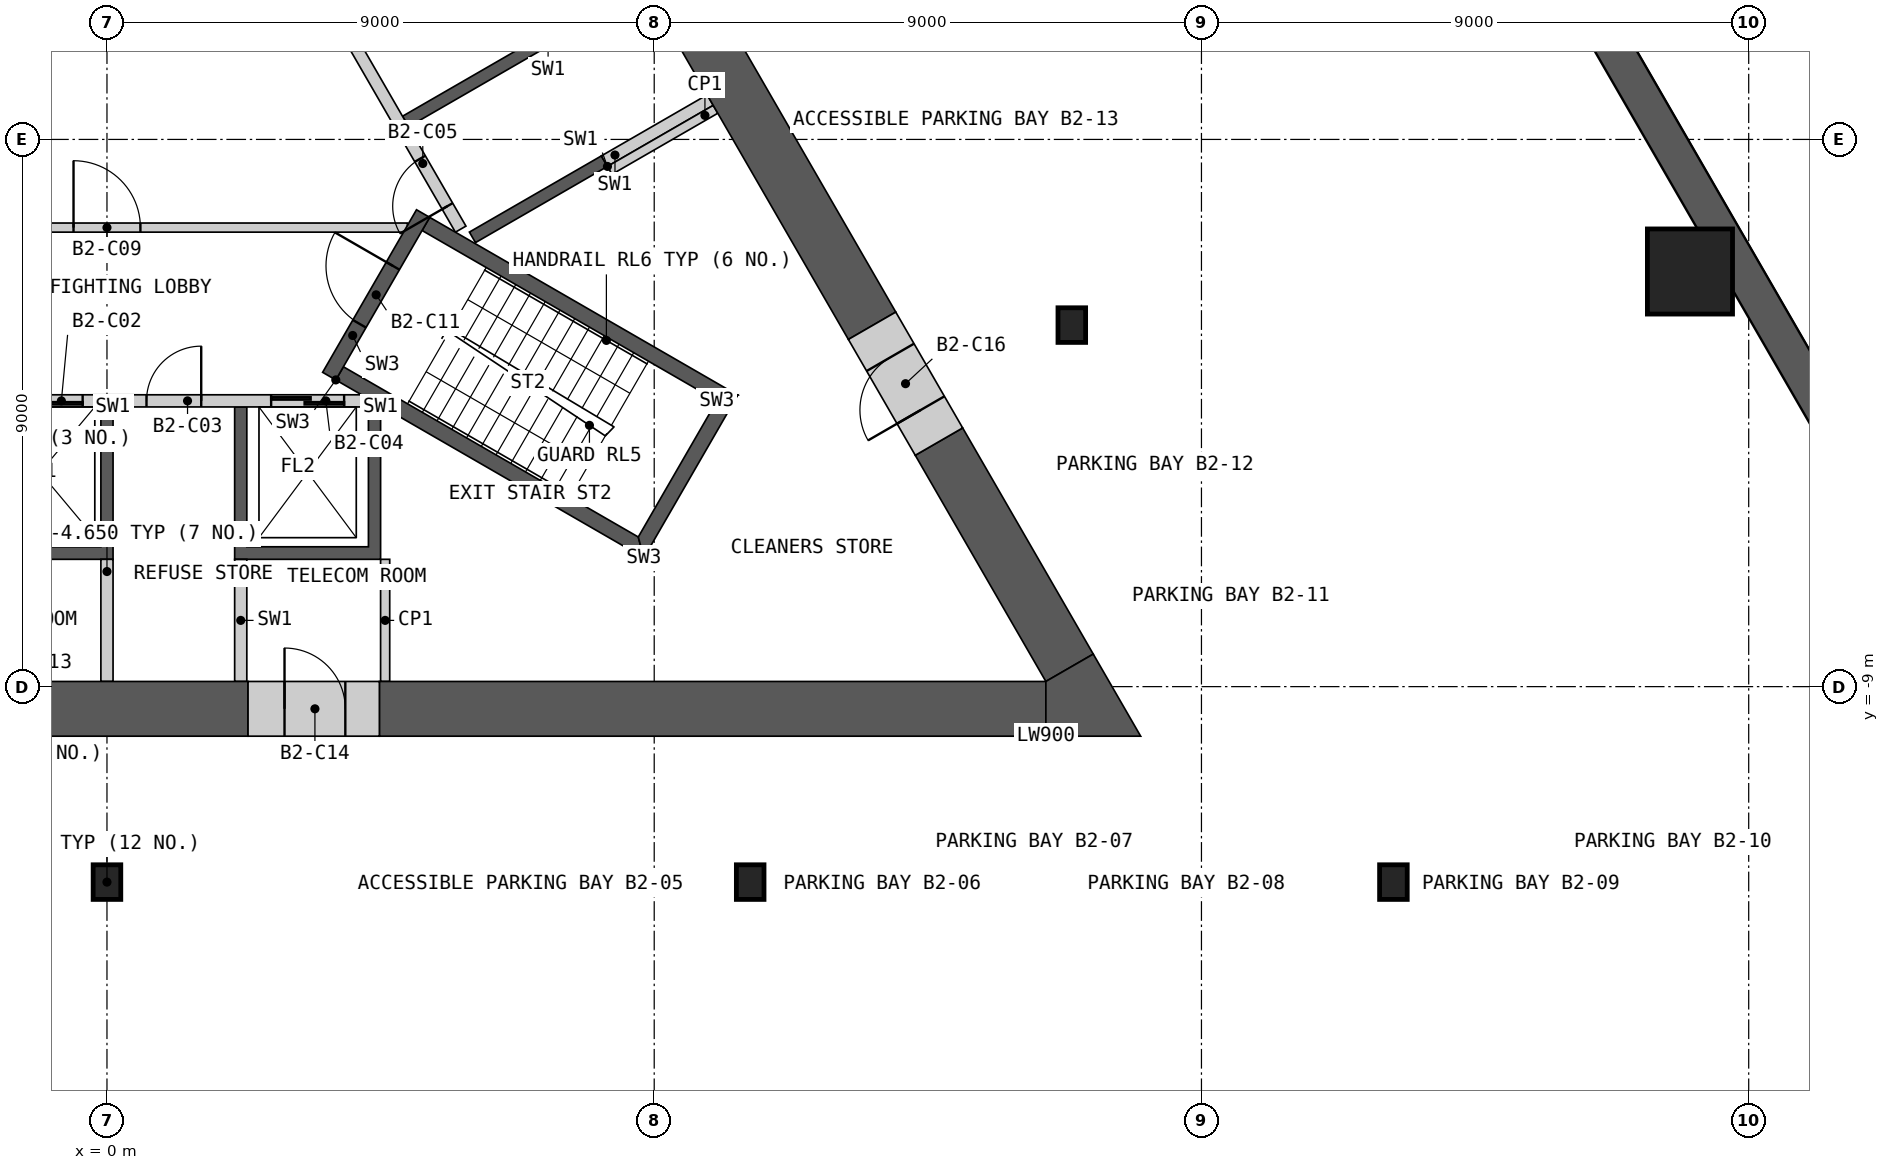
"""IFC4 building model, lengths in metres.
Left out: names, types, materials, properties, quantities, classifications, styles, units other than length and angle.
Written with IfcOpenShell. Run it as: python <this file> out.ifc"""

import sys

from ifc_helpers import new_model, si_unit, direction, frame, frame_2d, origin, origin_2d, place, context, subcontext, project, spatial, polyline, rectangle, hollow_rectangle, i_section, outline, extrude, element, fill, save


model = new_model("IFC4")
c1 = context("Model", 3, precision=1e-05, world=origin(), true_north=direction((0.0, 1.0)))
c2 = subcontext(c1, "Body", "Model", "MODEL_VIEW")
j1 = project(units=[si_unit("LENGTHUNIT", "METRE"), si_unit("PLANEANGLEUNIT", "RADIAN")], contexts=[c1])
p1 = place(None, origin())
s1 = spatial("IfcSite", under=j1, at=p1, CompositionType="ELEMENT")
p2 = place(p1, origin())
s2 = spatial("IfcBuilding", under=s1, at=p2, CompositionType="ELEMENT")
p3 = place(p2, frame((0.0, 0.0, -8.4)))
s3 = spatial("IfcBuildingStorey", under=s2, at=p3, CompositionType="ELEMENT", Elevation=-8.4)
p4 = place(p3, frame((28.154, -16.455, 0.0), z_axis=(0.0, 0.0, 1.0), x_axis=(0.499993492265, 0.866029160995, 0.0)))
e1 = element("IfcWall", 1, at=p4, inside=s3, PredefinedType="SOLIDWALL", context=c2, shape_type="SweptSolid", body=[
    extrude(rectangle(XDim=7.173, YDim=0.6, at=frame_2d((3.587, 0.0))), origin(), (0.0, 0.0, 1.0), 3.75),
])
p5 = place(p3, frame((31.74, -10.542, 0.0), z_axis=(0.0, 0.0, 1.0), x_axis=(-0.500000005698, 0.866025400495, 0.0)))
e2 = element("IfcWall", 2, at=p5, inside=s3, PredefinedType="SOLIDWALL", context=c2, shape_type="SweptSolid", body=[
    extrude(rectangle(XDim=50.0, YDim=0.6, at=frame_2d((25.0, 0.0))), origin(), (0.0, 0.0, 1.0), 3.75),
])
p6 = place(p3, frame((26.034, -2.172, 0.0), z_axis=(0.0, 0.0, 1.0), x_axis=(1.0, 0.0, 0.0)))
e3 = element("IfcColumn", 3, at=p6, inside=s3, PredefinedType="COLUMN", context=c2, shape_type="SweptSolid", body=[
    extrude(hollow_rectangle(XDim=1.4, YDim=1.4, WallThickness=0.1, at=origin_2d()), origin(), (0.0, 0.0, 1.0), 4.2),
])
for number, where, z_axis, x_axis in (
    (4, (0.0, -12.215, 0.0), (0.0, 0.0, 1.0), (1.0, 0.0, 0.0)),
    (5, (10.578, -12.215, 0.0), (0.0, 0.0, 1.0), (1.0, 0.0, 0.0)),
    (6, (21.157, -12.215, 0.0), (0.0, 0.0, 1.0), (1.0, 0.0, 0.0)),
    (7, (15.868, -3.054, 0.0), (0.0, 0.0, 1.0), (1.0, 0.0, 0.0)),
):
    element("IfcColumn", number, at=place(p3, frame(where, z_axis=z_axis, x_axis=x_axis)), inside=s3, PredefinedType="COLUMN", context=c2, shape_type="SweptSolid", body=[
        extrude(i_section(OverallWidth=0.454, OverallDepth=0.57, WebThickness=0.078, FlangeThickness=0.125, at=origin_2d()), origin(), (0.0, 0.0, 1.0), 4.2),
    ])
p7 = place(p3, origin())
e8 = element("IfcWall", 8, at=p7, inside=s3, PredefinedType="SHEAR", context=c2, shape_type="SweptSolid", body=[
    extrude(outline(polyline([(4.5, -4.4), (4.5, -6.906), (2.1, -6.906), (2.1, -4.4), (2.3, -4.4), (2.3, -6.7), (4.3, -6.7), (4.3, -4.4), (4.5, -4.4)])), origin(), (0.0, 0.0, 1.0), 3.75),
])
p8 = place(p3, origin())
e9 = element("IfcWall", 9, at=p8, inside=s3, PredefinedType="SHEAR", context=c2, shape_type="SweptSolid", body=[
    extrude(outline(polyline([(0.1, -4.4), (0.1, -6.906), (-4.5, -6.906), (-4.5, -4.4), (-4.3, -4.4), (-4.3, -6.7), (-2.3, -6.7), (-2.3, -4.4), (-2.1, -4.4), (-2.1, -6.7), (-0.1, -6.7), (-0.1, -4.4), (0.1, -4.4)])), origin(), (0.0, 0.0, 1.0), 3.75),
])
p9 = place(p3, frame((-4.187, -4.3, 0.0), z_axis=(0.0, 0.0, 1.0), x_axis=(1.0, 0.0, 0.0)))
e10 = element("IfcWall", 10, at=p9, inside=s3, PredefinedType="SOLIDWALL", context=c2, shape_type="SweptSolid", body=[
    extrude(rectangle(XDim=8.373, YDim=0.2, at=frame_2d((4.187, 0.0))), origin(), (0.0, 0.0, 1.0), 3.75),
])
p10 = place(p9, frame((0.287, 0.0, 0.0)))
e11 = element("IfcOpeningElement", 11, at=p10, cuts=e10, PredefinedType="OPENING", context=c2, shape_type="SweptSolid", body=[
    extrude(rectangle(XDim=1.2, YDim=2.1, at=frame_2d((0.6, 1.05))), frame((0.0, 0.11, 0.0), z_axis=(0.0, -1.0, 0.0), x_axis=(1.0, 0.0, 0.0)), (0.0, 0.0, 1.0), 0.22),
])
p11 = place(p9, frame((2.387, 0.0, 0.0)))
e12 = element("IfcOpeningElement", 12, at=p11, cuts=e10, PredefinedType="OPENING", context=c2, shape_type="SweptSolid", body=[
    extrude(rectangle(XDim=1.4, YDim=2.1, at=frame_2d((0.7, 1.05))), frame((0.0, 0.11, 0.0), z_axis=(0.0, -1.0, 0.0), x_axis=(1.0, 0.0, 0.0)), (0.0, 0.0, 1.0), 0.22),
])
p12 = place(p9, frame((4.837, 0.0, 0.0)))
e13 = element("IfcOpeningElement", 13, at=p12, cuts=e10, PredefinedType="OPENING", context=c2, shape_type="SweptSolid", body=[
    extrude(rectangle(XDim=0.9, YDim=2.1, at=frame_2d((0.45, 1.05))), frame((0.0, 0.11, 0.0), z_axis=(0.0, -1.0, 0.0), x_axis=(1.0, 0.0, 0.0)), (0.0, 0.0, 1.0), 0.22),
])
p13 = place(p9, frame((6.887, 0.0, 0.0)))
e14 = element("IfcOpeningElement", 14, at=p13, cuts=e10, PredefinedType="OPENING", context=c2, shape_type="SweptSolid", body=[
    extrude(rectangle(XDim=1.2, YDim=2.1, at=frame_2d((0.6, 1.05))), frame((0.0, 0.11, 0.0), z_axis=(0.0, -1.0, 0.0), x_axis=(1.0, 0.0, 0.0)), (0.0, 0.0, 1.0), 0.22),
])
for number, where, z_axis, x_axis in (
    (15, (0.0, -6.906, 0.0), (0.0, 0.0, 1.0), (0.0, -1.0, 0.0)),
    (16, (2.2, -6.906, 0.0), (0.0, 0.0, 1.0), (0.0, -1.0, 0.0)),
):
    element("IfcWall", number, at=place(p3, frame(where, z_axis=z_axis, x_axis=x_axis)), inside=s3, PredefinedType="SHEAR", context=c2, shape_type="SweptSolid", body=[
        extrude(rectangle(XDim=2.009, YDim=0.2, at=frame_2d((1.004, 0.0))), origin(), (0.0, 0.0, 1.0), 3.75),
    ])
p14 = place(p3, origin())
e17 = element("IfcWall", 17, at=p14, inside=s3, PredefinedType="SHEAR", context=c2, shape_type="SweptSolid", body=[
    extrude(outline(polyline([(1.561, 6.097), (3.731, 7.35), (7.131, 1.461), (4.96, 0.208), (4.861, 0.381), (6.852, 1.531), (3.652, 7.074), (1.66, 5.924), (1.561, 6.097)])), origin(), (0.0, 0.0, 1.0), 3.75),
])
p15 = place(p3, origin())
e18 = element("IfcWall", 18, at=p15, inside=s3, PredefinedType="SHEAR", context=c2, shape_type="SweptSolid", body=[
    extrude(outline(polyline([(8.231, -0.444), (6.061, -1.697), (5.96, -1.524), (8.131, -0.271), (8.231, -0.444)])), origin(), (0.0, 0.0, 1.0), 3.75),
])
p16 = place(p3, frame((5.817, -1.476, 0.0), z_axis=(0.0, 0.0, 1.0), x_axis=(-0.500002616675, 0.866023893041, 0.0)))
e19 = element("IfcWall", 19, at=p16, inside=s3, PredefinedType="SOLIDWALL", context=c2, shape_type="SweptSolid", body=[
    extrude(rectangle(XDim=8.373, YDim=0.2, at=frame_2d((4.187, 0.0))), origin(), (0.0, 0.0, 1.0), 3.75),
])
p17 = place(p16, frame((0.437, 0.0, 0.0)))
e20 = element("IfcOpeningElement", 20, at=p17, cuts=e19, PredefinedType="OPENING", context=c2, shape_type="SweptSolid", body=[
    extrude(rectangle(XDim=0.9, YDim=2.1, at=frame_2d((0.45, 1.05))), frame((0.0, 0.11, 0.0), z_axis=(0.0, -1.0, 0.0), x_axis=(1.0, 0.0, 0.0)), (0.0, 0.0, 1.0), 0.22),
])
p18 = place(p16, frame((4.837, 0.0, 0.0)))
e21 = element("IfcOpeningElement", 21, at=p18, cuts=e19, PredefinedType="OPENING", context=c2, shape_type="SweptSolid", body=[
    extrude(rectangle(XDim=0.9, YDim=2.1, at=frame_2d((0.45, 1.05))), frame((0.0, 0.11, 0.0), z_axis=(0.0, -1.0, 0.0), x_axis=(1.0, 0.0, 0.0)), (0.0, 0.0, 1.0), 0.22),
])
p19 = place(p3, frame((8.181, -0.357, 0.0), z_axis=(0.0, 0.0, 1.0), x_axis=(0.866035824272, 0.499981950752, 0.0)))
e22 = element("IfcWall", 22, at=p19, inside=s3, PredefinedType="SHEAR", context=c2, shape_type="SweptSolid", body=[
    extrude(rectangle(XDim=2.009, YDim=0.2, at=frame_2d((1.004, 0.0))), origin(), (0.0, 0.0, 1.0), 3.75),
])
p20 = place(p3, frame((-4.941, -1.45, 0.0), z_axis=(0.0, 0.0, 1.0), x_axis=(1.0, 0.0, 0.0)))
e23 = element("IfcWall", 23, at=p20, inside=s3, PredefinedType="PARTITIONING", context=c2, shape_type="SweptSolid", body=[
    extrude(rectangle(XDim=9.882, YDim=0.15, at=frame_2d((4.941, 0.0))), origin(), (0.0, 0.0, 1.0), 3.75),
])
p21 = place(p20, frame((4.391, 0.0, 0.0)))
e24 = element("IfcOpeningElement", 24, at=p21, cuts=e23, PredefinedType="OPENING", context=c2, shape_type="SweptSolid", body=[
    extrude(rectangle(XDim=1.1, YDim=2.1, at=frame_2d((0.55, 1.05))), frame((0.0, 0.085, 0.0), z_axis=(0.0, -1.0, 0.0), x_axis=(1.0, 0.0, 0.0)), (0.0, 0.0, 1.0), 0.17),
])
p22 = place(p3, origin())
e25 = element("IfcWall", 25, at=p22, inside=s3, PredefinedType="SHEAR", context=c2, shape_type="SweptSolid", body=[
    extrude(outline(polyline([(3.763, -3.956), (8.83, -6.881), (8.738, -6.539), (3.888, -3.739), (3.763, -3.956)])), origin(), (0.0, 0.0, 1.0), 3.75),
])
p23 = place(p3, origin())
e26 = element("IfcWall", 26, at=p23, inside=s3, PredefinedType="SHEAR", context=c2, shape_type="SweptSolid", body=[
    extrude(outline(polyline([(8.83, -6.881), (10.374, -4.206), (10.032, -4.298), (8.738, -6.539), (8.83, -6.881)])), origin(), (0.0, 0.0, 1.0), 3.75),
])
p24 = place(p3, origin())
e27 = element("IfcWall", 27, at=p24, inside=s3, PredefinedType="SHEAR", context=c2, shape_type="SweptSolid", body=[
    extrude(outline(polyline([(10.032, -4.298), (10.374, -4.206), (5.307, -1.281), (5.182, -1.498), (10.032, -4.298)])), origin(), (0.0, 0.0, 1.0), 3.75),
])
p25 = place(p3, frame((3.655, -3.893, 0.0), z_axis=(0.0, 0.0, 1.0), x_axis=(0.499982516597, 0.866035497597, 0.0)))
e28 = element("IfcWall", 28, at=p25, inside=s3, PredefinedType="SHEAR", context=c2, shape_type="SweptSolid", body=[
    extrude(rectangle(XDim=3.088, YDim=0.25, at=frame_2d((1.544, 0.0))), origin(), (0.0, 0.0, 1.0), 3.75),
])
p26 = place(p25, frame((0.994, 0.0, 0.0)))
e29 = element("IfcOpeningElement", 29, at=p26, cuts=e28, PredefinedType="OPENING", context=c2, shape_type="SweptSolid", body=[
    extrude(rectangle(XDim=1.1, YDim=2.1, at=frame_2d((0.55, 1.05))), frame((0.0, 0.135, 0.0), z_axis=(0.0, -1.0, 0.0), x_axis=(1.0, 0.0, 0.0)), (0.0, 0.0, 1.0), 0.27),
])
p27 = place(p3, frame((4.575, -6.906, 0.0), z_axis=(0.0, 0.0, 1.0), x_axis=(0.0, -1.0, 0.0)))
e30 = element("IfcWall", 30, at=p27, inside=s3, PredefinedType="PARTITIONING", context=c2, shape_type="SweptSolid", body=[
    extrude(rectangle(XDim=2.009, YDim=0.15, at=frame_2d((1.004, 0.0))), origin(), (0.0, 0.0, 1.0), 3.75),
])
p28 = place(p3, frame((8.268, -0.509, 0.0), z_axis=(0.0, 0.0, 1.0), x_axis=(0.866035824272, 0.499981950752, 0.0)))
e31 = element("IfcWall", 31, at=p28, inside=s3, PredefinedType="PARTITIONING", context=c2, shape_type="SweptSolid", body=[
    extrude(rectangle(XDim=2.009, YDim=0.15, at=frame_2d((1.004, 0.0))), origin(), (0.0, 0.0, 1.0), 3.75),
])
p29 = place(p3, frame((4.48, -9.365, 0.0), z_axis=(0.0, 0.0, 1.0), x_axis=(1.0, 0.0, 0.0)))
e32 = element("IfcWall", 32, at=p29, inside=s3, PredefinedType="SHEAR", context=c2, shape_type="SweptSolid", body=[
    extrude(rectangle(XDim=10.961, YDim=0.9, at=frame_2d((5.48, 0.0))), origin(), (0.0, 0.0, 1.0), 3.75),
])
p30 = place(p3, frame((-1.2, -9.365, 0.0), z_axis=(0.0, 0.0, 1.0), x_axis=(1.0, 0.0, 0.0)))
e33 = element("IfcWall", 33, at=p30, inside=s3, PredefinedType="SHEAR", context=c2, shape_type="SweptSolid", body=[
    extrude(rectangle(XDim=3.52, YDim=0.9, at=frame_2d((1.76, 0.0))), origin(), (0.0, 0.0, 1.0), 3.75),
])
p31 = place(p3, frame((12.583, -3.065, 0.0), z_axis=(0.0, 0.0, 1.0), x_axis=(-0.499991853951, 0.866030106857, 0.0)))
e34 = element("IfcWall", 34, at=p31, inside=s3, PredefinedType="SHEAR", context=c2, shape_type="SweptSolid", body=[
    extrude(rectangle(XDim=10.094, YDim=0.9, at=frame_2d((5.047, 0.0))), origin(), (0.0, 0.0, 1.0), 3.75),
])
p32 = place(p3, frame((15.831, -8.69, 0.0), z_axis=(0.0, 0.0, 1.0), x_axis=(-0.499996331799, 0.866027521611, 0.0)))
e35 = element("IfcWall", 35, at=p32, inside=s3, PredefinedType="SHEAR", context=c2, shape_type="SweptSolid", body=[
    extrude(rectangle(XDim=4.295, YDim=0.9, at=frame_2d((2.148, 0.0))), origin(), (0.0, 0.0, 1.0), 3.75),
])
p33 = place(p3, origin())
e36 = element("IfcWall", 36, at=p33, inside=s3, PredefinedType="SHEAR", context=c2, shape_type="SweptSolid", body=[
    extrude(outline(polyline([(15.441, -9.815), (15.441, -8.915), (16.221, -8.465), (17.0, -9.815), (15.441, -9.815)])), origin(), (0.0, 0.0, 1.0), 3.75),
])
p34 = place(p3, frame((2.32, -9.365, 0.0), z_axis=(0.0, 0.0, 1.0), x_axis=(1.0, 0.0, 0.0)))
e37 = element("IfcWall", 37, at=p34, inside=s3, PredefinedType="SHEAR", context=c2, shape_type="SweptSolid", body=[
    extrude(rectangle(XDim=2.16, YDim=0.9, at=frame_2d((1.08, 0.0))), origin(), (0.0, 0.0, 1.0), 3.75),
])
p35 = place(p34, frame((0.6, 0.0, 0.0)))
e38 = element("IfcOpeningElement", 38, at=p35, cuts=e37, PredefinedType="OPENING", context=c2, shape_type="SweptSolid", body=[
    extrude(rectangle(XDim=1.0, YDim=2.1, at=frame_2d((0.5, 1.05))), frame((0.0, 0.46, 0.0), z_axis=(0.0, -1.0, 0.0), x_axis=(1.0, 0.0, 0.0)), (0.0, 0.0, 1.0), 0.92),
])
p36 = place(p3, frame((13.683, -4.97, 0.0), z_axis=(0.0, 0.0, 1.0), x_axis=(-0.50002983664, 0.866008176907, 0.0)))
e39 = element("IfcWall", 39, at=p36, inside=s3, PredefinedType="SHEAR", context=c2, shape_type="SweptSolid", body=[
    extrude(rectangle(XDim=2.2, YDim=0.9, at=frame_2d((1.1, 0.0))), origin(), (0.0, 0.0, 1.0), 3.75),
])
p37 = place(p36, frame((0.6, 0.0, 0.0)))
e40 = element("IfcOpeningElement", 40, at=p37, cuts=e39, PredefinedType="OPENING", context=c2, shape_type="SweptSolid", body=[
    extrude(rectangle(XDim=1.0, YDim=2.1, at=frame_2d((0.5, 1.05))), frame((0.0, 0.46, 0.0), z_axis=(0.0, -1.0, 0.0), x_axis=(1.0, 0.0, 0.0)), (0.0, 0.0, 1.0), 0.92),
])
p38 = place(p11, origin())
e41 = element("IfcDoor", 41, at=p38, inside=s3, OperationType="SLIDING_TO_LEFT", PredefinedType="DOOR", context=c2, shape_type="SweptSolid", body=[
    extrude(rectangle(XDim=1.4, YDim=2.1, at=frame_2d((0.7, 1.05))), frame((0.0, 0.025, 0.0), z_axis=(0.0, -1.0, 0.0), x_axis=(1.0, 0.0, 0.0)), (0.0, 0.0, 1.0), 0.05),
])
fill(e12, e41)
p39 = place(p12, origin())
e42 = element("IfcDoor", 42, at=p39, inside=s3, OperationType="SINGLE_SWING_RIGHT", PredefinedType="DOOR", context=c2, shape_type="SweptSolid", body=[
    extrude(rectangle(XDim=0.9, YDim=2.1, at=frame_2d((0.45, 1.05))), frame((0.0, 0.025, 0.0), z_axis=(0.0, -1.0, 0.0), x_axis=(1.0, 0.0, 0.0)), (0.0, 0.0, 1.0), 0.05),
])
fill(e13, e42)
p40 = place(p13, origin())
e43 = element("IfcDoor", 43, at=p40, inside=s3, OperationType="SLIDING_TO_LEFT", PredefinedType="DOOR", context=c2, shape_type="SweptSolid", body=[
    extrude(rectangle(XDim=1.2, YDim=2.1, at=frame_2d((0.6, 1.05))), frame((0.0, 0.025, 0.0), z_axis=(0.0, -1.0, 0.0), x_axis=(1.0, 0.0, 0.0)), (0.0, 0.0, 1.0), 0.05),
])
fill(e14, e43)
p41 = place(p17, origin())
e44 = element("IfcDoor", 44, at=p41, inside=s3, OperationType="SINGLE_SWING_LEFT", PredefinedType="DOOR", context=c2, shape_type="SweptSolid", body=[
    extrude(rectangle(XDim=0.9, YDim=2.1, at=frame_2d((0.45, 1.05))), frame((0.0, 0.025, 0.0), z_axis=(0.0, -1.0, 0.0), x_axis=(1.0, 0.0, 0.0)), (0.0, 0.0, 1.0), 0.05),
])
fill(e20, e44)
p42 = place(p21, origin())
e45 = element("IfcDoor", 45, at=p42, inside=s3, OperationType="SINGLE_SWING_LEFT", PredefinedType="DOOR", context=c2, shape_type="SweptSolid", body=[
    extrude(rectangle(XDim=1.1, YDim=2.1, at=frame_2d((0.55, 1.05))), frame((0.0, 0.025, 0.0), z_axis=(0.0, -1.0, 0.0), x_axis=(1.0, 0.0, 0.0)), (0.0, 0.0, 1.0), 0.05),
])
fill(e24, e45)
p43 = place(p26, origin())
e46 = element("IfcDoor", 46, at=p43, inside=s3, OperationType="SINGLE_SWING_RIGHT", PredefinedType="DOOR", context=c2, shape_type="SweptSolid", body=[
    extrude(rectangle(XDim=1.1, YDim=2.1, at=frame_2d((0.55, 1.05))), frame((0.0, 0.025, 0.0), z_axis=(0.0, -1.0, 0.0), x_axis=(1.0, 0.0, 0.0)), (0.0, 0.0, 1.0), 0.05),
])
fill(e29, e46)
p44 = place(p35, origin())
e47 = element("IfcDoor", 47, at=p44, inside=s3, OperationType="SINGLE_SWING_LEFT", PredefinedType="DOOR", context=c2, shape_type="SweptSolid", body=[
    extrude(rectangle(XDim=1.0, YDim=2.1, at=frame_2d((0.5, 1.05))), frame((0.0, 0.205, 0.0), z_axis=(0.0, -1.0, 0.0), x_axis=(1.0, 0.0, 0.0)), (0.0, 0.0, 1.0), 0.05),
])
fill(e38, e47)
p45 = place(p37, origin())
e48 = element("IfcDoor", 48, at=p45, inside=s3, OperationType="SINGLE_SWING_LEFT", PredefinedType="DOOR", context=c2, shape_type="SweptSolid", body=[
    extrude(rectangle(XDim=1.0, YDim=2.1, at=frame_2d((0.5, 1.05))), frame((0.0, 0.205, 0.0), z_axis=(0.0, -1.0, 0.0), x_axis=(1.0, 0.0, 0.0)), (0.0, 0.0, 1.0), 0.05),
])
fill(e40, e48)
save(model, sys.argv[1])
